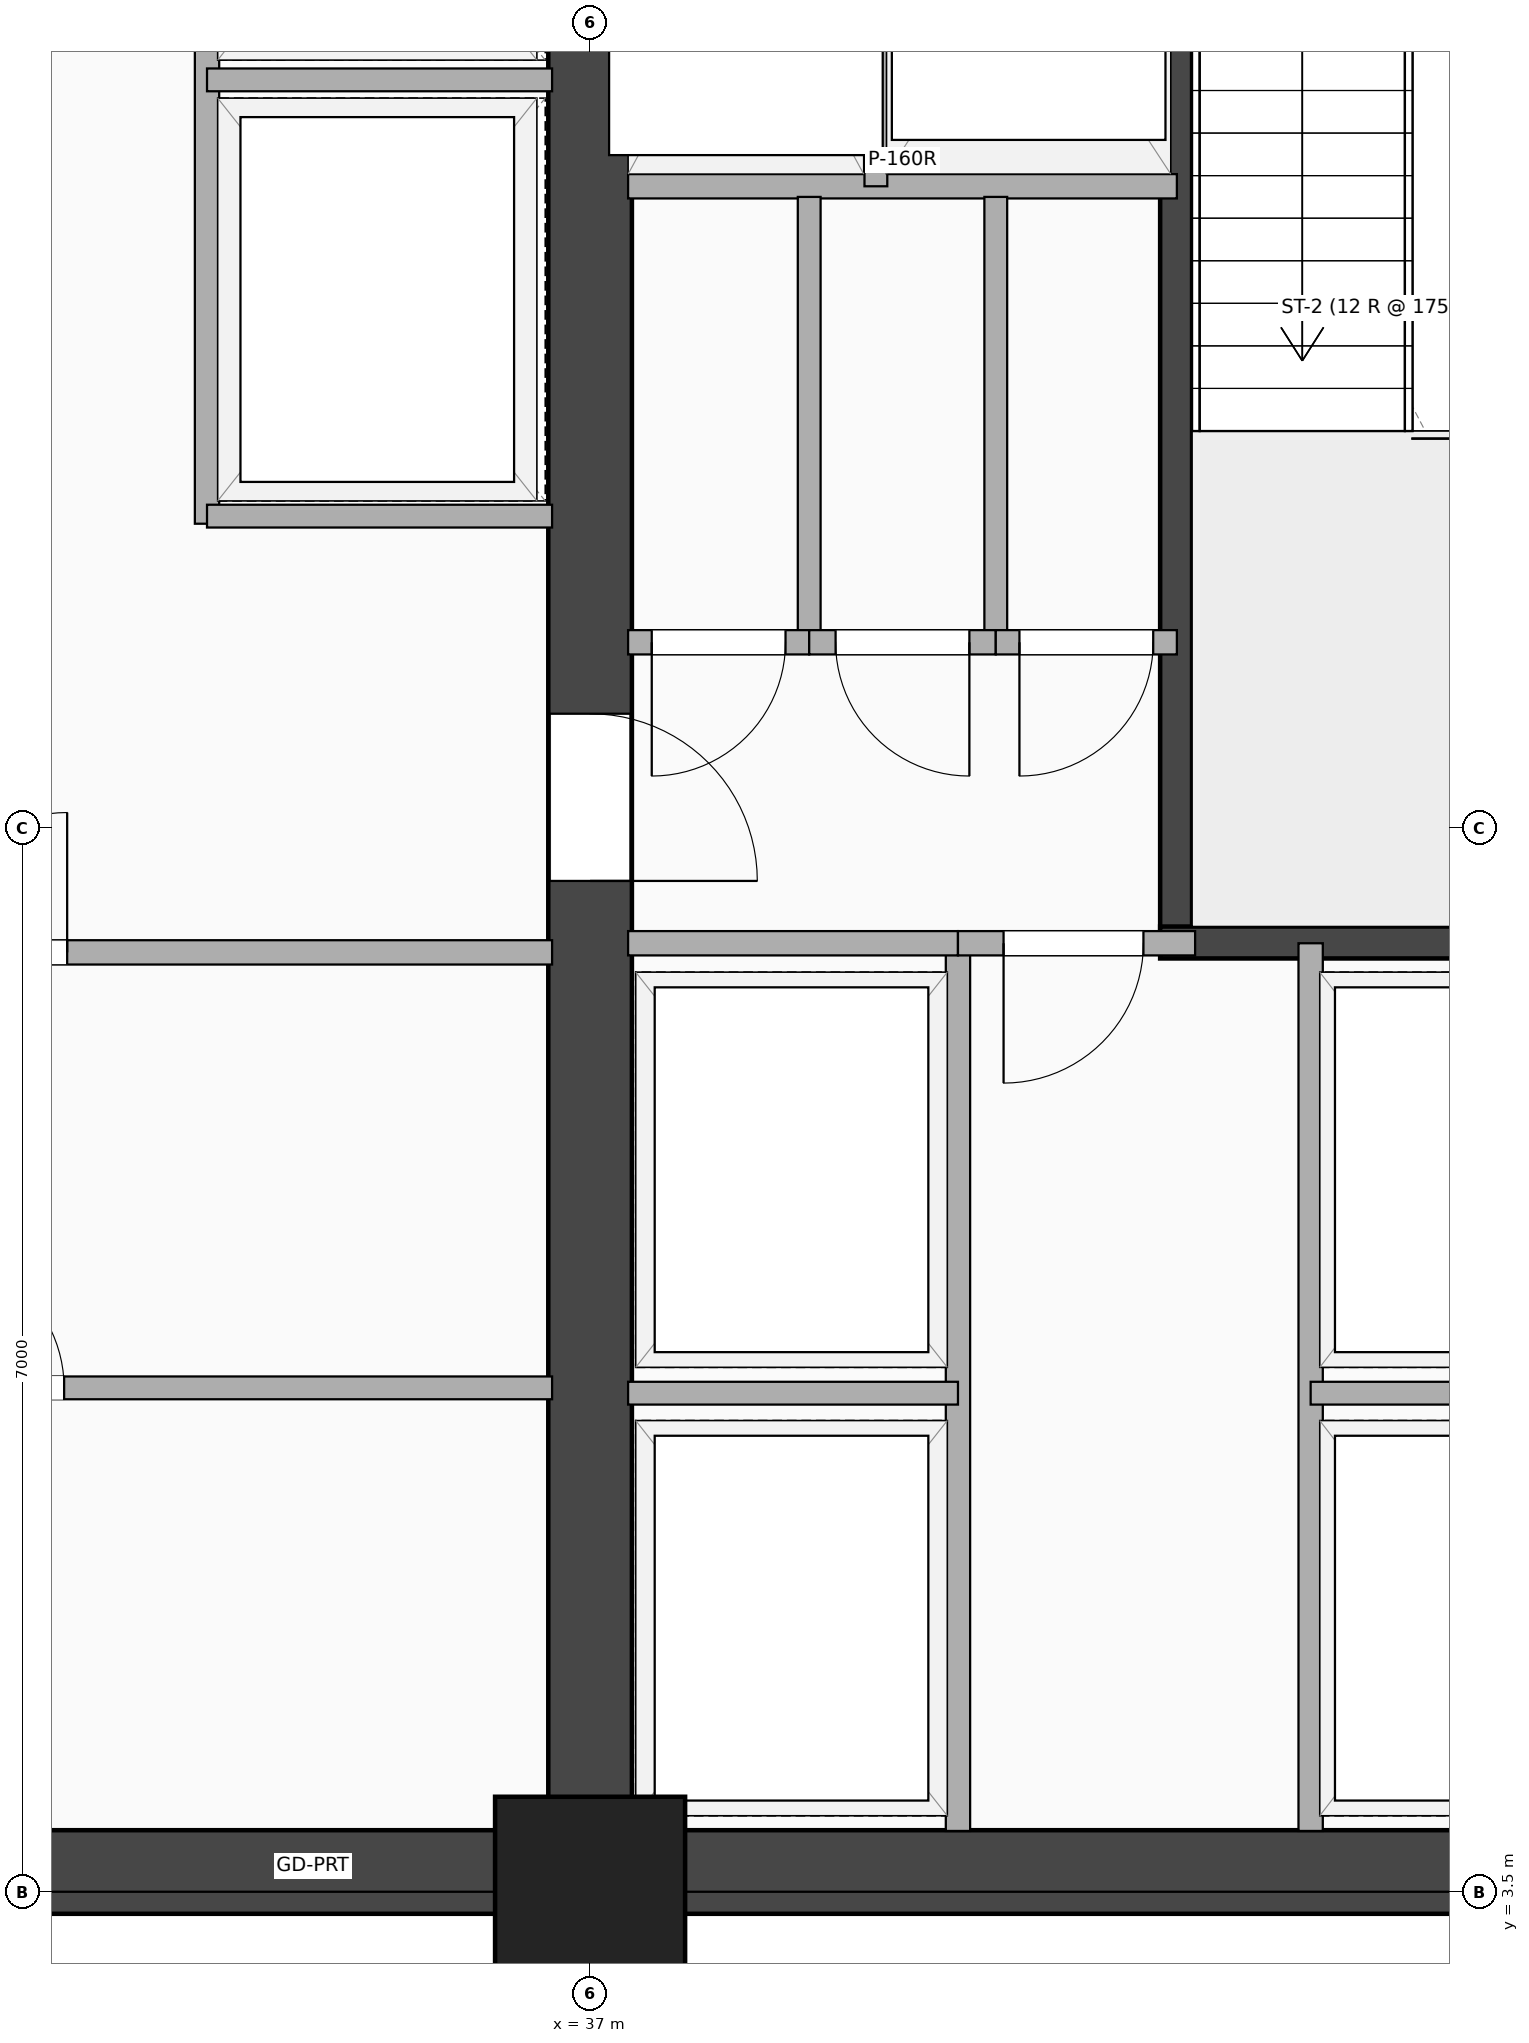
"""IFC4 building model, lengths in metres.
Left out: names, types, materials, properties, quantities, classifications, styles, units other than length and angle.
Written with IfcOpenShell. Run it as: python <this file> out.ifc"""

import sys

from ifc_helpers import new_model, si_unit, direction, frame, frame_2d, origin, origin_2d, place, context, subcontext, project, spatial, rectangle, extrude, element, fill, save


model = new_model("IFC4")
c1 = context("Model", 3, precision=1e-05, world=origin(), true_north=direction((0.0, 1.0)))
c2 = subcontext(c1, "Body", "Model", "MODEL_VIEW")
j1 = project(units=[si_unit("LENGTHUNIT", "METRE"), si_unit("PLANEANGLEUNIT", "RADIAN")], contexts=[c1])
p1 = place(None, origin())
s1 = spatial("IfcSite", under=j1, at=p1, CompositionType="ELEMENT")
p2 = place(p1, origin())
s2 = spatial("IfcBuilding", under=s1, at=p2, CompositionType="ELEMENT")
p3 = place(p2, frame((0.0, 0.0, 130.2)))
s3 = spatial("IfcBuildingStorey", under=s2, at=p3, CompositionType="ELEMENT", Elevation=130.2)
p4 = place(p3, frame((20.3, 3.63, 0.0), z_axis=(0.0, 0.0, 1.0), x_axis=(1.0, 0.0, 0.0)))
e1 = element("IfcWall", 1, at=p4, inside=s3, PredefinedType="SHEAR", context=c2, shape_type="SweptSolid", body=[
    extrude(rectangle(XDim=24.5, YDim=0.55, at=frame_2d((12.25, 0.0))), origin(), (0.0, 0.0, 1.0), 8.15),
])
p5 = place(p3, frame((37.0, 3.5, 0.0), z_axis=(0.0, 0.0, 1.0), x_axis=(0.0, 1.0, 0.0)))
e2 = element("IfcWall", 2, at=p5, inside=s3, PredefinedType="SHEAR", context=c2, shape_type="SweptSolid", body=[
    extrude(rectangle(XDim=16.9, YDim=0.55, at=frame_2d((8.45, 0.0))), origin(), (0.0, 0.0, 1.0), 8.15),
])
p6 = place(p5, frame((6.65, 0.0, 0.0)))
e3 = element("IfcOpeningElement", 3, at=p6, cuts=e2, PredefinedType="OPENING", context=c2, shape_type="SweptSolid", body=[
    extrude(rectangle(XDim=1.1, YDim=2.15, at=frame_2d((0.55, 1.075))), frame((0.0, 0.285, 0.0), z_axis=(0.0, -1.0, 0.0), x_axis=(1.0, 0.0, 0.0)), (0.0, 0.0, 1.0), 0.57),
])
p7 = place(p3, frame((40.855, 9.745, 0.0), z_axis=(0.0, 0.0, 1.0), x_axis=(0.0, 1.0, 0.0)))
e4 = element("IfcWall", 4, at=p7, inside=s3, PredefinedType="SHEAR", context=c2, shape_type="SweptSolid", body=[
    extrude(rectangle(XDim=8.01, YDim=0.21, at=frame_2d((4.005, 0.0))), origin(), (0.0, 0.0, 1.0), 8.15),
])
p8 = place(p3, frame((40.75, 9.745, 0.0), z_axis=(0.0, 0.0, 1.0), x_axis=(1.0, 0.0, 0.0)))
e5 = element("IfcWall", 5, at=p8, inside=s3, PredefinedType="SHEAR", context=c2, shape_type="SweptSolid", body=[
    extrude(rectangle(XDim=3.66, YDim=0.21, at=frame_2d((1.83, 0.0))), origin(), (0.0, 0.0, 1.0), 8.15),
])
p9 = place(p3, frame((37.0, 3.5, -0.32), z_axis=(0.0, 0.0, 1.0), x_axis=(1.0, 0.0, 0.0)))
e6 = element("IfcColumn", 6, at=p9, inside=s3, PredefinedType="COLUMN", context=c2, shape_type="SweptSolid", body=[
    extrude(rectangle(XDim=1.25, YDim=1.25, at=origin_2d()), origin(), (0.0, 0.0, 1.0), 8.47),
])
p10 = place(p3, frame((37.25, 14.72, 0.0), z_axis=(0.0, 0.0, 1.0), x_axis=(1.0, 0.0, 0.0)))
e7 = element("IfcWall", 7, at=p10, inside=s3, PredefinedType="PARTITIONING", context=c2, shape_type="SweptSolid", body=[
    extrude(rectangle(XDim=3.61, YDim=0.16, at=frame_2d((1.805, 0.0))), origin(), (0.0, 0.0, 1.0), 8.15),
])
p11 = place(p3, frame((38.88, 14.72, 0.0), z_axis=(0.0, 0.0, 1.0), x_axis=(0.0, 1.0, 0.0)))
e8 = element("IfcWall", 8, at=p11, inside=s3, PredefinedType="PARTITIONING", context=c2, shape_type="SweptSolid", body=[
    extrude(rectangle(XDim=3.04, YDim=0.15, at=frame_2d((1.52, 0.0))), origin(), (0.0, 0.0, 1.0), 8.15),
])
p12 = place(p3, frame((38.441, 11.72, 0.0), z_axis=(0.0, 0.0, 1.0), x_axis=(0.0, 1.0, 0.0)))
e9 = element("IfcWall", 9, at=p12, inside=s3, PredefinedType="PARTITIONING", context=c2, shape_type="SweptSolid", body=[
    extrude(rectangle(XDim=2.93, YDim=0.15, at=frame_2d((1.465, 0.0))), origin(), (0.0, 0.0, 1.0), 8.15),
])
p13 = place(p3, frame((37.25, 11.72, 0.0), z_axis=(0.0, 0.0, 1.0), x_axis=(1.0, 0.0, 0.0)))
e10 = element("IfcWall", 10, at=p13, inside=s3, PredefinedType="PARTITIONING", context=c2, shape_type="SweptSolid", body=[
    extrude(rectangle(XDim=1.191, YDim=0.16, at=frame_2d((0.596, 0.0))), origin(), (0.0, 0.0, 1.0), 8.15),
])
p14 = place(p13, frame((0.156, 0.0, 0.0)))
e11 = element("IfcOpeningElement", 11, at=p14, cuts=e10, PredefinedType="OPENING", context=c2, shape_type="SweptSolid", body=[
    extrude(rectangle(XDim=0.88, YDim=2.08, at=frame_2d((0.44, 1.04))), frame((0.0, 0.09, 0.0), z_axis=(0.0, -1.0, 0.0), x_axis=(1.0, 0.0, 0.0)), (0.0, 0.0, 1.0), 0.18),
])
p15 = place(p3, frame((39.669, 11.72, 0.0), z_axis=(0.0, 0.0, 1.0), x_axis=(0.0, 1.0, 0.0)))
e12 = element("IfcWall", 12, at=p15, inside=s3, PredefinedType="PARTITIONING", context=c2, shape_type="SweptSolid", body=[
    extrude(rectangle(XDim=2.93, YDim=0.15, at=frame_2d((1.465, 0.0))), origin(), (0.0, 0.0, 1.0), 8.15),
])
p16 = place(p3, frame((38.441, 11.72, 0.0), z_axis=(0.0, 0.0, 1.0), x_axis=(1.0, 0.0, 0.0)))
e13 = element("IfcWall", 13, at=p16, inside=s3, PredefinedType="PARTITIONING", context=c2, shape_type="SweptSolid", body=[
    extrude(rectangle(XDim=1.227, YDim=0.16, at=frame_2d((0.614, 0.0))), origin(), (0.0, 0.0, 1.0), 8.15),
])
p17 = place(p16, frame((0.174, 0.0, 0.0)))
e14 = element("IfcOpeningElement", 14, at=p17, cuts=e13, PredefinedType="OPENING", context=c2, shape_type="SweptSolid", body=[
    extrude(rectangle(XDim=0.88, YDim=2.08, at=frame_2d((0.44, 1.04))), frame((0.0, 0.09, 0.0), z_axis=(0.0, -1.0, 0.0), x_axis=(1.0, 0.0, 0.0)), (0.0, 0.0, 1.0), 0.18),
])
p18 = place(p3, frame((39.669, 11.72, 0.0), z_axis=(0.0, 0.0, 1.0), x_axis=(1.0, 0.0, 0.0)))
e15 = element("IfcWall", 15, at=p18, inside=s3, PredefinedType="PARTITIONING", context=c2, shape_type="SweptSolid", body=[
    extrude(rectangle(XDim=1.191, YDim=0.16, at=frame_2d((0.596, 0.0))), origin(), (0.0, 0.0, 1.0), 8.15),
])
p19 = place(p18, frame((0.156, 0.0, 0.0)))
e16 = element("IfcOpeningElement", 16, at=p19, cuts=e15, PredefinedType="OPENING", context=c2, shape_type="SweptSolid", body=[
    extrude(rectangle(XDim=0.88, YDim=2.08, at=frame_2d((0.44, 1.04))), frame((0.0, 0.09, 0.0), z_axis=(0.0, -1.0, 0.0), x_axis=(1.0, 0.0, 0.0)), (0.0, 0.0, 1.0), 0.18),
])
for number, where, z_axis, x_axis in (
    (17, (39.42, 3.9, 0.0), (0.0, 0.0, 1.0), (0.0, 1.0, 0.0)),
    (18, (41.74, 3.9, 0.0), (0.0, 0.0, 1.0), (0.0, 1.0, 0.0)),
):
    element("IfcWall", number, at=place(p3, frame(where, z_axis=z_axis, x_axis=x_axis)), inside=s3, PredefinedType="PARTITIONING", context=c2, shape_type="SweptSolid", body=[
        extrude(rectangle(XDim=5.84, YDim=0.16, at=frame_2d((2.92, 0.0))), origin(), (0.0, 0.0, 1.0), 8.15),
    ])
p20 = place(p3, frame((37.25, 6.78, 0.0), z_axis=(0.0, 0.0, 1.0), x_axis=(1.0, 0.0, 0.0)))
e19 = element("IfcWall", 19, at=p20, inside=s3, PredefinedType="PARTITIONING", context=c2, shape_type="SweptSolid", body=[
    extrude(rectangle(XDim=2.17, YDim=0.15, at=frame_2d((1.085, 0.0))), origin(), (0.0, 0.0, 1.0), 8.15),
])
p21 = place(p3, frame((41.74, 6.78, 0.0), z_axis=(0.0, 0.0, 1.0), x_axis=(1.0, 0.0, 0.0)))
e20 = element("IfcWall", 20, at=p21, inside=s3, PredefinedType="PARTITIONING", context=c2, shape_type="SweptSolid", body=[
    extrude(rectangle(XDim=2.66, YDim=0.15, at=frame_2d((1.33, 0.0))), origin(), (0.0, 0.0, 1.0), 6.455),
])
p22 = place(p3, frame((37.25, 9.74, 0.0), z_axis=(0.0, 0.0, 1.0), x_axis=(1.0, 0.0, 0.0)))
e21 = element("IfcWall", 21, at=p22, inside=s3, PredefinedType="PARTITIONING", context=c2, shape_type="SweptSolid", body=[
    extrude(rectangle(XDim=2.17, YDim=0.16, at=frame_2d((1.085, 0.0))), origin(), (0.0, 0.0, 1.0), 8.15),
])
p23 = place(p3, frame((39.42, 9.74, 0.0), z_axis=(0.0, 0.0, 1.0), x_axis=(1.0, 0.0, 0.0)))
e22 = element("IfcWall", 22, at=p23, inside=s3, PredefinedType="PARTITIONING", context=c2, shape_type="SweptSolid", body=[
    extrude(rectangle(XDim=1.56, YDim=0.16, at=frame_2d((0.78, 0.0))), origin(), (0.0, 0.0, 1.0), 8.15),
])
p24 = place(p23, frame((0.3, 0.0, 0.0)))
e23 = element("IfcOpeningElement", 23, at=p24, cuts=e22, PredefinedType="OPENING", context=c2, shape_type="SweptSolid", body=[
    extrude(rectangle(XDim=0.92, YDim=2.08, at=frame_2d((0.46, 1.04))), frame((0.0, 0.09, 0.0), z_axis=(0.0, -1.0, 0.0), x_axis=(1.0, 0.0, 0.0)), (0.0, 0.0, 1.0), 0.18),
])
p25 = place(p3, frame((29.45, 9.68, 0.0), z_axis=(0.0, 0.0, 1.0), x_axis=(1.0, 0.0, 0.0)))
e24 = element("IfcWall", 24, at=p25, inside=s3, PredefinedType="PARTITIONING", context=c2, shape_type="SweptSolid", body=[
    extrude(rectangle(XDim=7.3, YDim=0.16, at=frame_2d((3.65, 0.0))), origin(), (0.0, 0.0, 1.0), 8.15),
])
p26 = place(p25, frame((4.11, 0.0, 0.0), z_axis=(0.0, 0.0, 1.0), x_axis=(-1.0, 0.0, 0.0)))
e25 = element("IfcOpeningElement", 25, at=p26, cuts=e24, PredefinedType="OPENING", context=c2, shape_type="SweptSolid", body=[
    extrude(rectangle(XDim=0.92, YDim=2.08, at=frame_2d((0.46, 1.04))), frame((0.0, 0.09, 0.0), z_axis=(0.0, -1.0, 0.0), x_axis=(1.0, 0.0, 0.0)), (0.0, 0.0, 1.0), 0.18),
])
p27 = place(p3, frame((29.45, 6.815, 0.0), z_axis=(0.0, 0.0, 1.0), x_axis=(1.0, 0.0, 0.0)))
e26 = element("IfcWall", 26, at=p27, inside=s3, PredefinedType="PARTITIONING", context=c2, shape_type="SweptSolid", body=[
    extrude(rectangle(XDim=7.3, YDim=0.15, at=frame_2d((3.65, 0.0))), origin(), (0.0, 0.0, 1.0), 8.15),
])
p28 = place(p27, frame((4.09, 0.0, 0.0), z_axis=(0.0, 0.0, 1.0), x_axis=(-1.0, 0.0, 0.0)))
e27 = element("IfcOpeningElement", 27, at=p28, cuts=e26, PredefinedType="OPENING", context=c2, shape_type="SweptSolid", body=[
    extrude(rectangle(XDim=0.88, YDim=2.08, at=frame_2d((0.44, 1.04))), frame((0.0, 0.085, 0.0), z_axis=(0.0, -1.0, 0.0), x_axis=(1.0, 0.0, 0.0)), (0.0, 0.0, 1.0), 0.17),
])
p29 = place(p3, frame((34.48, 12.5, 0.0), z_axis=(0.0, 0.0, 1.0), x_axis=(0.0, 1.0, 0.0)))
e28 = element("IfcWall", 28, at=p29, inside=s3, PredefinedType="PARTITIONING", context=c2, shape_type="SweptSolid", body=[
    extrude(rectangle(XDim=7.92, YDim=0.16, at=frame_2d((3.96, 0.0))), origin(), (0.0, 0.0, 1.0), 7.524),
])
p30 = place(p29, frame((6.98, 0.0, 0.0), z_axis=(0.0, 0.0, 1.0), x_axis=(-1.0, 0.0, 0.0)))
e29 = element("IfcOpeningElement", 29, at=p30, cuts=e28, PredefinedType="OPENING", context=c2, shape_type="SweptSolid", body=[
    extrude(rectangle(XDim=0.88, YDim=2.08, at=frame_2d((0.44, 1.04))), frame((0.0, 0.09, 0.0), z_axis=(0.0, -1.0, 0.0), x_axis=(1.0, 0.0, 0.0)), (0.0, 0.0, 1.0), 0.18),
])
for number, where, z_axis, x_axis in (
    (30, (34.48, 12.55, 0.0), (0.0, 0.0, 1.0), (1.0, 0.0, 0.0)),
    (31, (34.48, 15.42, 0.0), (0.0, 0.0, 1.0), (1.0, 0.0, 0.0)),
):
    element("IfcWall", number, at=place(p3, frame(where, z_axis=z_axis, x_axis=x_axis)), inside=s3, PredefinedType="PARTITIONING", context=c2, shape_type="SweptSolid", body=[
        extrude(rectangle(XDim=2.27, YDim=0.15, at=frame_2d((1.135, 0.0))), origin(), (0.0, 0.0, 1.0), 8.15),
    ])
p31 = place(p6, origin())
e32 = element("IfcDoor", 32, at=p31, inside=s3, OperationType="SINGLE_SWING_LEFT", PredefinedType="DOOR", context=c2, shape_type="SweptSolid", body=[
    extrude(rectangle(XDim=1.1, YDim=2.15, at=frame_2d((0.55, 1.075))), frame((0.0, 0.025, 0.0), z_axis=(0.0, -1.0, 0.0), x_axis=(1.0, 0.0, 0.0)), (0.0, 0.0, 1.0), 0.05),
])
fill(e3, e32)
p32 = place(p14, origin())
e33 = element("IfcDoor", 33, at=p32, inside=s3, OperationType="SINGLE_SWING_LEFT", PredefinedType="DOOR", context=c2, shape_type="SweptSolid", body=[
    extrude(rectangle(XDim=0.88, YDim=2.08, at=frame_2d((0.44, 1.04))), frame((0.0, 0.025, 0.0), z_axis=(0.0, -1.0, 0.0), x_axis=(1.0, 0.0, 0.0)), (0.0, 0.0, 1.0), 0.05),
])
fill(e11, e33)
p33 = place(p17, origin())
e34 = element("IfcDoor", 34, at=p33, inside=s3, OperationType="SINGLE_SWING_RIGHT", PredefinedType="DOOR", context=c2, shape_type="SweptSolid", body=[
    extrude(rectangle(XDim=0.88, YDim=2.08, at=frame_2d((0.44, 1.04))), frame((0.0, 0.025, 0.0), z_axis=(0.0, -1.0, 0.0), x_axis=(1.0, 0.0, 0.0)), (0.0, 0.0, 1.0), 0.05),
])
fill(e14, e34)
p34 = place(p19, origin())
e35 = element("IfcDoor", 35, at=p34, inside=s3, OperationType="SINGLE_SWING_LEFT", PredefinedType="DOOR", context=c2, shape_type="SweptSolid", body=[
    extrude(rectangle(XDim=0.88, YDim=2.08, at=frame_2d((0.44, 1.04))), frame((0.0, 0.025, 0.0), z_axis=(0.0, -1.0, 0.0), x_axis=(1.0, 0.0, 0.0)), (0.0, 0.0, 1.0), 0.05),
])
fill(e16, e35)
p35 = place(p24, origin())
e36 = element("IfcDoor", 36, at=p35, inside=s3, OperationType="SINGLE_SWING_LEFT", PredefinedType="DOOR", context=c2, shape_type="SweptSolid", body=[
    extrude(rectangle(XDim=0.92, YDim=2.08, at=frame_2d((0.46, 1.04))), frame((0.0, 0.025, 0.0), z_axis=(0.0, -1.0, 0.0), x_axis=(1.0, 0.0, 0.0)), (0.0, 0.0, 1.0), 0.05),
])
fill(e23, e36)
p36 = place(p26, origin())
e37 = element("IfcDoor", 37, at=p36, inside=s3, OperationType="SINGLE_SWING_RIGHT", PredefinedType="DOOR", context=c2, shape_type="SweptSolid", body=[
    extrude(rectangle(XDim=0.92, YDim=2.08, at=frame_2d((0.46, 1.04))), frame((0.0, 0.025, 0.0), z_axis=(0.0, -1.0, 0.0), x_axis=(1.0, 0.0, 0.0)), (0.0, 0.0, 1.0), 0.05),
])
fill(e25, e37)
p37 = place(p28, origin())
e38 = element("IfcDoor", 38, at=p37, inside=s3, OperationType="SINGLE_SWING_LEFT", PredefinedType="DOOR", context=c2, shape_type="SweptSolid", body=[
    extrude(rectangle(XDim=0.88, YDim=2.08, at=frame_2d((0.44, 1.04))), frame((0.0, 0.025, 0.0), z_axis=(0.0, -1.0, 0.0), x_axis=(1.0, 0.0, 0.0)), (0.0, 0.0, 1.0), 0.05),
])
fill(e27, e38)
save(model, sys.argv[1])
